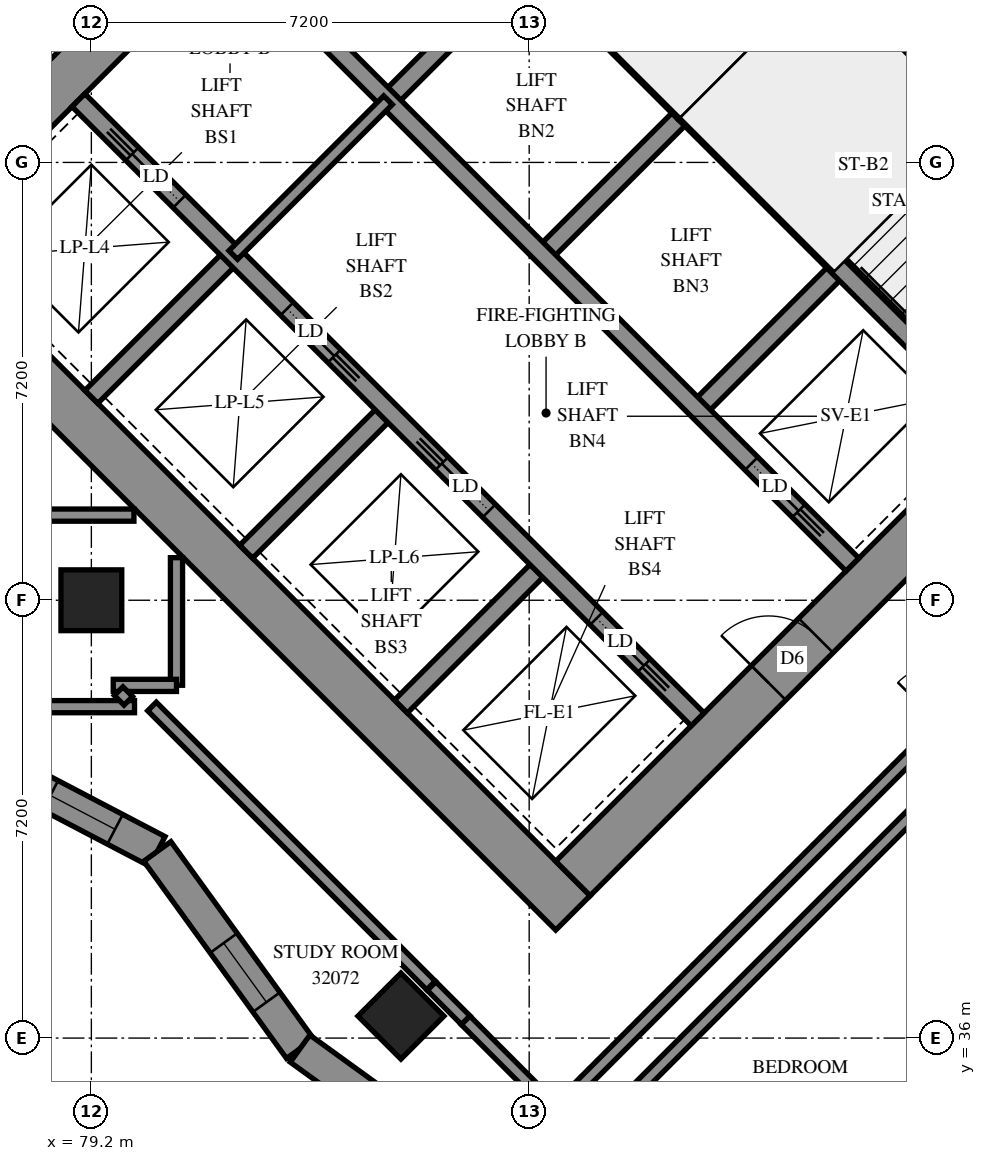
"""IFC4 building model, lengths in metres.
Left out: names, types, materials, properties, quantities, classifications, styles, units other than length and angle.
Written with IfcOpenShell. Run it as: python <this file> out.ifc"""

import sys

from ifc_helpers import new_model, si_unit, direction, frame, frame_2d, origin, origin_2d, place, context, subcontext, project, spatial, polyline, rectangle, outline, extrude, element, fill, save


model = new_model("IFC4")
c1 = context("Model", 3, precision=1e-05, world=origin(), true_north=direction((0.0, 1.0)))
c2 = subcontext(c1, "Body", "Model", "MODEL_VIEW")
j1 = project(units=[si_unit("LENGTHUNIT", "METRE"), si_unit("PLANEANGLEUNIT", "RADIAN")], contexts=[c1])
p1 = place(None, origin())
s1 = spatial("IfcSite", under=j1, at=p1, CompositionType="ELEMENT")
p2 = place(p1, origin())
s2 = spatial("IfcBuilding", under=s1, at=p2, CompositionType="ELEMENT")
p3 = place(p2, frame((0.0, 0.0, 118.6)))
s3 = spatial("IfcBuildingStorey", under=s2, at=p3, CompositionType="ELEMENT", Elevation=118.6)
for number, where, z_axis, x_axis in (
    (1, (79.2, 43.2, 0.0), (0.0, 0.0, 1.0), (1.0, 0.0, 0.0)),
    (2, (84.291, 36.362, 0.0), (0.0, 0.0, 1.0), (0.707, -0.707, 0.0)),
):
    element("IfcColumn", number, at=place(p3, frame(where, z_axis=z_axis, x_axis=x_axis)), inside=s3, PredefinedType="COLUMN", context=c2, shape_type="SweptSolid", body=[
        extrude(rectangle(XDim=1.0, YDim=1.0, at=origin_2d()), origin(), (0.0, 0.0, 1.0), 3.1),
    ])
p4 = place(p3, frame((75.806, 49.373, -0.3), z_axis=(0.0, 0.0, 1.0), x_axis=(0.7071067812, -0.7071067812, 0.0)))
e3 = element("IfcWall", 3, at=p4, inside=s3, PredefinedType="SHEAR", context=c2, shape_type="SweptSolid", body=[
    extrude(rectangle(XDim=16.0, YDim=0.8, at=frame_2d((8.0, 0.0))), origin(), (0.0, 0.0, 1.0), 2.7),
])
p5 = place(p3, frame((86.554, 60.121, -0.3), z_axis=(0.0, 0.0, 1.0), x_axis=(0.7071067812, -0.7071067812, 0.0)))
e4 = element("IfcWall", 4, at=p5, inside=s3, PredefinedType="SHEAR", context=c2, shape_type="SweptSolid", body=[
    extrude(rectangle(XDim=16.0, YDim=0.8, at=frame_2d((8.0, 0.0))), origin(), (0.0, 0.0, 1.0), 2.7),
])
p6 = place(p5, frame((10.8, 0.0, 0.3)))
e5 = element("IfcOpeningElement", 5, at=p6, cuts=e4, PredefinedType="OPENING", context=c2, shape_type="SweptSolid", body=[
    extrude(rectangle(XDim=0.8, YDim=2.1, at=frame_2d((0.4, 1.05))), frame((0.0, 0.41, 0.0), z_axis=(0.0, -1.0, 0.0), x_axis=(1.0, 0.0, 0.0)), (0.0, 0.0, 1.0), 0.82),
])
p7 = place(p3, frame((76.372, 49.373, -0.3), z_axis=(0.0, 0.0, 1.0), x_axis=(0.7071067812, 0.7071067812, 0.0)))
e6 = element("IfcWall", 6, at=p7, inside=s3, PredefinedType="SHEAR", context=c2, shape_type="SweptSolid", body=[
    extrude(rectangle(XDim=14.4, YDim=0.8, at=frame_2d((7.2, 0.0))), origin(), (0.0, 0.0, 1.0), 2.7),
])
p8 = place(p7, frame((4.55, 0.0, 0.3)))
e7 = element("IfcOpeningElement", 7, at=p8, cuts=e6, PredefinedType="OPENING", context=c2, shape_type="SweptSolid", body=[
    extrude(rectangle(XDim=1.1, YDim=2.1, at=frame_2d((0.55, 1.05))), frame((0.0, 0.41, 0.0), z_axis=(0.0, -1.0, 0.0), x_axis=(1.0, 0.0, 0.0)), (0.0, 0.0, 1.0), 0.82),
])
p9 = place(p7, frame((11.35, 0.0, 0.3)))
e8 = element("IfcOpeningElement", 8, at=p9, cuts=e6, PredefinedType="OPENING", context=c2, shape_type="SweptSolid", body=[
    extrude(rectangle(XDim=1.1, YDim=2.1, at=frame_2d((0.55, 1.05))), frame((0.0, 0.41, 0.0), z_axis=(0.0, -1.0, 0.0), x_axis=(1.0, 0.0, 0.0)), (0.0, 0.0, 1.0), 0.82),
])
p10 = place(p3, frame((87.12, 38.625, -0.3), z_axis=(0.0, 0.0, 1.0), x_axis=(0.7071067812, 0.7071067812, 0.0)))
e9 = element("IfcWall", 9, at=p10, inside=s3, PredefinedType="SHEAR", context=c2, shape_type="SweptSolid", body=[
    extrude(rectangle(XDim=14.4, YDim=0.8, at=frame_2d((7.2, 0.0))), origin(), (0.0, 0.0, 1.0), 2.7),
])
p11 = place(p10, frame((4.55, 0.0, 0.3)))
e10 = element("IfcOpeningElement", 10, at=p11, cuts=e9, PredefinedType="OPENING", context=c2, shape_type="SweptSolid", body=[
    extrude(rectangle(XDim=1.1, YDim=2.1, at=frame_2d((0.55, 1.05))), frame((0.0, 0.41, 0.0), z_axis=(0.0, -1.0, 0.0), x_axis=(1.0, 0.0, 0.0)), (0.0, 0.0, 1.0), 0.82),
])
p12 = place(p10, frame((11.35, 0.0, 0.3)))
e11 = element("IfcOpeningElement", 11, at=p12, cuts=e9, PredefinedType="OPENING", context=c2, shape_type="SweptSolid", body=[
    extrude(rectangle(XDim=1.1, YDim=2.1, at=frame_2d((0.55, 1.05))), frame((0.0, 0.41, 0.0), z_axis=(0.0, -1.0, 0.0), x_axis=(1.0, 0.0, 0.0)), (0.0, 0.0, 1.0), 0.82),
])
for number, where, z_axis, x_axis in (
    (12, (79.2, 46.544, 0.0), (0.0, 0.0, 1.0), (0.707, 0.707, 0.0)),
    (13, (84.079, 51.423, 0.0), (0.0, 0.0, 1.0), (0.707, 0.707, 0.0)),
):
    element("IfcWall", number, at=place(p3, frame(where, z_axis=z_axis, x_axis=x_axis)), inside=s3, PredefinedType="SOLIDWALL", context=c2, shape_type="SweptSolid", body=[
        extrude(rectangle(XDim=3.3, YDim=0.3, at=frame_2d((1.65, 0.0))), origin(), (0.0, 0.0, 1.0), 3.1),
    ])
p13 = place(p3, frame((81.746, 43.999, 0.0), z_axis=(0.0, 0.0, 1.0), x_axis=(0.7071067812, 0.7071067812, 0.0)))
e14 = element("IfcWall", 14, at=p13, inside=s3, PredefinedType="SOLIDWALL", context=c2, shape_type="SweptSolid", body=[
    extrude(rectangle(XDim=3.3, YDim=0.3, at=frame_2d((1.65, 0.0))), origin(), (0.0, 0.0, 1.0), 3.1),
])
p14 = place(p3, frame((86.625, 48.878, 0.0), z_axis=(0.0, 0.0, 1.0), x_axis=(0.7071067812, 0.7071067812, 0.0)))
e15 = element("IfcWall", 15, at=p14, inside=s3, PredefinedType="SOLIDWALL", context=c2, shape_type="SweptSolid", body=[
    extrude(rectangle(XDim=3.3, YDim=0.3, at=frame_2d((1.65, 0.0))), origin(), (0.0, 0.0, 1.0), 3.1),
])
p15 = place(p3, frame((84.291, 41.453, 0.0), z_axis=(0.0, 0.0, 1.0), x_axis=(0.7071067812, 0.7071067812, 0.0)))
e16 = element("IfcWall", 16, at=p15, inside=s3, PredefinedType="SOLIDWALL", context=c2, shape_type="SweptSolid", body=[
    extrude(rectangle(XDim=3.3, YDim=0.3, at=frame_2d((1.65, 0.0))), origin(), (0.0, 0.0, 1.0), 3.1),
])
p16 = place(p3, frame((89.17, 46.332, 0.0), z_axis=(0.0, 0.0, 1.0), x_axis=(0.7071067812, 0.7071067812, 0.0)))
e17 = element("IfcWall", 17, at=p16, inside=s3, PredefinedType="SOLIDWALL", context=c2, shape_type="SweptSolid", body=[
    extrude(rectangle(XDim=3.3, YDim=0.3, at=frame_2d((1.65, 0.0))), origin(), (0.0, 0.0, 1.0), 3.1),
])
p17 = place(p3, frame((78.988, 51.423, 0.0), z_axis=(0.0, 0.0, 1.0), x_axis=(0.7071067812, -0.7071067812, 0.0)))
e18 = element("IfcWall", 18, at=p17, inside=s3, PredefinedType="SOLIDWALL", context=c2, shape_type="SweptSolid", body=[
    extrude(rectangle(XDim=14.4, YDim=0.3, at=frame_2d((7.2, 0.0))), origin(), (0.0, 0.0, 1.0), 3.1),
])
p18 = place(p17, frame((1.25, 0.0, 0.0)))
e19 = element("IfcOpeningElement", 19, at=p18, cuts=e18, PredefinedType="OPENING", context=c2, shape_type="SweptSolid", body=[
    extrude(rectangle(XDim=1.1, YDim=2.1, at=frame_2d((0.55, 1.05))), frame((0.0, 0.16, 0.0), z_axis=(0.0, -1.0, 0.0), x_axis=(1.0, 0.0, 0.0)), (0.0, 0.0, 1.0), 0.32),
])
p19 = place(p17, frame((4.85, 0.0, 0.0)))
e20 = element("IfcOpeningElement", 20, at=p19, cuts=e18, PredefinedType="OPENING", context=c2, shape_type="SweptSolid", body=[
    extrude(rectangle(XDim=1.1, YDim=2.1, at=frame_2d((0.55, 1.05))), frame((0.0, 0.16, 0.0), z_axis=(0.0, -1.0, 0.0), x_axis=(1.0, 0.0, 0.0)), (0.0, 0.0, 1.0), 0.32),
])
p20 = place(p17, frame((8.45, 0.0, 0.0)))
e21 = element("IfcOpeningElement", 21, at=p20, cuts=e18, PredefinedType="OPENING", context=c2, shape_type="SweptSolid", body=[
    extrude(rectangle(XDim=1.1, YDim=2.1, at=frame_2d((0.55, 1.05))), frame((0.0, 0.16, 0.0), z_axis=(0.0, -1.0, 0.0), x_axis=(1.0, 0.0, 0.0)), (0.0, 0.0, 1.0), 0.32),
])
p21 = place(p17, frame((12.05, 0.0, 0.0)))
e22 = element("IfcOpeningElement", 22, at=p21, cuts=e18, PredefinedType="OPENING", context=c2, shape_type="SweptSolid", body=[
    extrude(rectangle(XDim=1.1, YDim=2.1, at=frame_2d((0.55, 1.05))), frame((0.0, 0.16, 0.0), z_axis=(0.0, -1.0, 0.0), x_axis=(1.0, 0.0, 0.0)), (0.0, 0.0, 1.0), 0.32),
])
p22 = place(p3, frame((81.534, 53.969, 0.0), z_axis=(0.0, 0.0, 1.0), x_axis=(0.707103309, -0.7071102534, 0.0)))
e23 = element("IfcWall", 23, at=p22, inside=s3, PredefinedType="SOLIDWALL", context=c2, shape_type="SweptSolid", body=[
    extrude(rectangle(XDim=14.4, YDim=0.3, at=frame_2d((7.2, 0.0))), origin(), (0.0, 0.0, 1.0), 3.1),
])
p23 = place(p22, frame((12.05, 0.0, 0.0)))
e24 = element("IfcOpeningElement", 24, at=p23, cuts=e23, PredefinedType="OPENING", context=c2, shape_type="SweptSolid", body=[
    extrude(rectangle(XDim=1.1, YDim=2.1, at=frame_2d((0.55, 1.05))), frame((0.0, 0.16, 0.0), z_axis=(0.0, -1.0, 0.0), x_axis=(1.0, 0.0, 0.0)), (0.0, 0.0, 1.0), 0.32),
])
for number, where, z_axis, x_axis in (
    (25, (83.867, 56.302, 0.0), (0.0, 0.0, 1.0), (0.707, -0.707, 0.0)),
    (26, (88.958, 51.211, 0.0), (0.0, 0.0, 1.0), (0.707, -0.707, 0.0)),
):
    element("IfcWall", number, at=place(p3, frame(where, z_axis=z_axis, x_axis=x_axis)), inside=s3, PredefinedType="SOLIDWALL", context=c2, shape_type="SweptSolid", body=[
        extrude(rectangle(XDim=7.2, YDim=0.3, at=frame_2d((3.6, 0.0))), origin(), (0.0, 0.0, 1.0), 3.1),
    ])
p24 = place(p3, frame((88.958, 51.211, 0.0), z_axis=(0.0, 0.0, 1.0), x_axis=(0.7071067812, 0.7071067812, 0.0)))
e27 = element("IfcWall", 27, at=p24, inside=s3, PredefinedType="SOLIDWALL", context=c2, shape_type="SweptSolid", body=[
    extrude(rectangle(XDim=4.2, YDim=0.3, at=frame_2d((2.1, 0.0))), origin(), (0.0, 0.0, 1.0), 3.1),
])
p25 = place(p3, frame((76.561, 41.019, 0.0), z_axis=(0.0, 0.0, 1.0), x_axis=(0.8859460506, -0.4637883089, 0.0)))
e28 = element("IfcWall", 28, at=p25, inside=s3, PredefinedType="SOLIDWALL", context=c2, shape_type="SweptSolid", body=[
    extrude(outline(polyline([(0.019, -0.275), (4.139, -0.275), (4.268, 0.275), (-0.019, 0.275), (0.019, -0.275)])), origin(), (0.0, 0.0, 1.0), 3.1),
])
p26 = place(p25, frame((0.717, 0.0, 0.5)))
e29 = element("IfcOpeningElement", 29, at=p26, cuts=e28, PredefinedType="OPENING", context=c2, shape_type="SweptSolid", body=[
    extrude(rectangle(XDim=1.2, YDim=2.45, at=frame_2d((0.6, 1.225))), frame((0.0, 0.285, 0.0), z_axis=(0.0, -1.0, 0.0), x_axis=(1.0, 0.0, 0.0)), (0.0, 0.0, 1.0), 0.57),
])
p27 = place(p25, frame((2.219, 0.0, 0.5)))
e30 = element("IfcOpeningElement", 30, at=p27, cuts=e28, PredefinedType="OPENING", context=c2, shape_type="SweptSolid", body=[
    extrude(rectangle(XDim=1.2, YDim=2.45, at=frame_2d((0.6, 1.225))), frame((0.0, 0.285, 0.0), z_axis=(0.0, -1.0, 0.0), x_axis=(1.0, 0.0, 0.0)), (0.0, 0.0, 1.0), 0.57),
])
p28 = place(p3, frame((80.285, 39.07, 0.0), z_axis=(0.0, 0.0, 1.0), x_axis=(0.5863448025, -0.8100615857, 0.0)))
e31 = element("IfcWall", 31, at=p28, inside=s3, PredefinedType="SOLIDWALL", context=c2, shape_type="SweptSolid", body=[
    extrude(outline(polyline([(0.065, -0.275), (4.047, -0.275), (3.959, 0.275), (-0.065, 0.275), (0.065, -0.275)])), origin(), (0.0, 0.0, 1.0), 3.1),
])
p29 = place(p28, frame((1.861, 0.0, 0.5)))
e32 = element("IfcOpeningElement", 32, at=p29, cuts=e31, PredefinedType="OPENING", context=c2, shape_type="SweptSolid", body=[
    extrude(rectangle(XDim=1.2, YDim=2.45, at=frame_2d((0.6, 1.225))), frame((0.0, 0.285, 0.0), z_axis=(0.0, -1.0, 0.0), x_axis=(1.0, 0.0, 0.0)), (0.0, 0.0, 1.0), 0.57),
])
p30 = place(p3, frame((82.632, 35.827, 0.0), z_axis=(0.0, 0.0, 1.0), x_axis=(0.8100630266, -0.5863428119, 0.0)))
e33 = element("IfcWall", 33, at=p30, inside=s3, PredefinedType="SOLIDWALL", context=c2, shape_type="SweptSolid", body=[
    extrude(outline(polyline([(-0.044, -0.275), (3.939, -0.275), (4.027, 0.275), (0.044, 0.275), (-0.044, -0.275)])), origin(), (0.0, 0.0, 1.0), 3.1),
])
p31 = place(p30, frame((1.694, 0.0, 0.5)))
e34 = element("IfcOpeningElement", 34, at=p31, cuts=e33, PredefinedType="OPENING", context=c2, shape_type="SweptSolid", body=[
    extrude(rectangle(XDim=1.2, YDim=2.45, at=frame_2d((0.6, 1.225))), frame((0.0, 0.285, 0.0), z_axis=(0.0, -1.0, 0.0), x_axis=(1.0, 0.0, 0.0)), (0.0, 0.0, 1.0), 0.57),
])
p32 = place(p3, frame((91.313, 53.354, 0.0), z_axis=(0.0, 0.0, 1.0), x_axis=(0.7071067812, -0.7071067812, 0.0)))
e35 = element("IfcWall", 35, at=p32, inside=s3, PredefinedType="PARTITIONING", context=c2, shape_type="SweptSolid", body=[
    extrude(rectangle(XDim=5.65, YDim=0.15, at=frame_2d((2.825, 0.0))), origin(), (0.0, 0.0, 1.0), 3.1),
])
p33 = place(p3, frame((81.534, 48.878, 0.0), z_axis=(0.0, 0.0, 1.0), x_axis=(0.707092892, 0.7071206701, 0.0)))
e36 = element("IfcWall", 36, at=p33, inside=s3, PredefinedType="PARTITIONING", context=c2, shape_type="SweptSolid", body=[
    extrude(rectangle(XDim=3.6, YDim=0.2, at=frame_2d((1.8, 0.0))), origin(), (0.0, 0.0, 1.0), 3.1),
])
p34 = place(p3, frame((86.329, 33.31, 0.0), z_axis=(0.0, 0.0, 1.0), x_axis=(0.7071067812, 0.7071067812, 0.0)))
e37 = element("IfcWall", 37, at=p34, inside=s3, PredefinedType="PARTITIONING", context=c2, shape_type="SweptSolid", body=[
    extrude(rectangle(XDim=11.617, YDim=0.2, at=frame_2d((5.808, 0.0))), origin(), (0.0, 0.0, 1.0), 3.1),
])
p35 = place(p3, frame((91.45, 28.248, 0.0), z_axis=(0.0, 0.0, 1.0), x_axis=(0.7071931644, 0.7070203875, 0.0)))
e38 = element("IfcWall", 38, at=p35, inside=s3, PredefinedType="PARTITIONING", context=c2, shape_type="SweptSolid", body=[
    extrude(rectangle(XDim=11.576, YDim=0.2, at=frame_2d((5.788, 0.0))), origin(), (0.0, 0.0, 1.0), 3.1),
])
p36 = place(p3, frame((86.835, 34.806, 0.0), z_axis=(0.0, 0.0, 1.0), x_axis=(0.7071067812, 0.7071067812, 0.0)))
e39 = element("IfcWall", 39, at=p36, inside=s3, PredefinedType="PARTITIONING", context=c2, shape_type="SweptSolid", body=[
    extrude(rectangle(XDim=10.201, YDim=0.2, at=frame_2d((5.1, 0.0))), origin(), (0.0, 0.0, 1.0), 3.1),
])
p37 = place(p36, frame((8.959, 0.0, 0.0)))
e40 = element("IfcOpeningElement", 40, at=p37, cuts=e39, PredefinedType="OPENING", context=c2, shape_type="SweptSolid", body=[
    extrude(rectangle(XDim=1.0, YDim=2.1, at=frame_2d((0.5, 1.05))), frame((0.0, 0.11, 0.0), z_axis=(0.0, -1.0, 0.0), x_axis=(1.0, 0.0, 0.0)), (0.0, 0.0, 1.0), 0.22),
])
p38 = place(p3, frame((80.197, 41.453, 0.0), z_axis=(0.0, 0.0, 1.0), x_axis=(0.7071067812, -0.7071067812, 0.0)))
e41 = element("IfcWall", 41, at=p38, inside=s3, PredefinedType="PARTITIONING", context=c2, shape_type="SweptSolid", body=[
    extrude(rectangle(XDim=6.488, YDim=0.2, at=frame_2d((3.244, 0.0))), origin(), (0.0, 0.0, 1.0), 3.1),
])
p39 = place(p3, frame((89.881, 31.771, 0.0), z_axis=(0.0, 0.0, 1.0), x_axis=(0.7071067812, 0.7071067812, 0.0)))
e42 = element("IfcWall", 42, at=p39, inside=s3, PredefinedType="PARTITIONING", context=c2, shape_type="SweptSolid", body=[
    extrude(rectangle(XDim=5.787, YDim=0.2, at=frame_2d((2.893, 0.0))), origin(), (0.0, 0.0, 1.0), 3.1),
])
p40 = place(p3, frame((77.452, 41.45, 0.0), z_axis=(0.0, 0.0, 1.0), x_axis=(1.0, 0.0, 0.0)))
e43 = element("IfcWall", 43, at=p40, inside=s3, PredefinedType="PARTITIONING", context=c2, shape_type="SweptSolid", body=[
    extrude(rectangle(XDim=2.458, YDim=0.2, at=frame_2d((1.229, 0.0))), origin(), (0.0, 0.0, 1.0), 3.1),
])
p41 = place(p3, frame((85.353, 36.293, 0.0), z_axis=(0.0, 0.0, 1.0), x_axis=(0.7066304548, -0.7075827869, 0.0)))
e44 = element("IfcWall", 44, at=p41, inside=s3, PredefinedType="PARTITIONING", context=c2, shape_type="SweptSolid", body=[
    extrude(rectangle(XDim=2.1, YDim=0.2, at=frame_2d((1.05, 0.0))), origin(), (0.0, 0.0, 1.0), 3.1),
])
for number, where, z_axis, x_axis in (
    (45, (77.802, 44.6, 0.0), (0.0, 0.0, 1.0), (1.0, 0.0, 0.0)),
    (46, (80.6, 41.802, 0.0), (0.0, 0.0, 1.0), (0.0, 1.0, 0.0)),
):
    element("IfcWall", number, at=place(p3, frame(where, z_axis=z_axis, x_axis=x_axis)), inside=s3, PredefinedType="PARTITIONING", context=c2, shape_type="SweptSolid", body=[
        extrude(rectangle(XDim=2.098, YDim=0.2, at=frame_2d((1.049, 0.0))), origin(), (0.0, 0.0, 1.0), 3.1),
    ])
p42 = place(p3, frame((79.56, 41.8, 0.0), z_axis=(0.0, 0.0, 1.0), x_axis=(1.0, 0.0, 0.0)))
e47 = element("IfcWall", 47, at=p42, inside=s3, PredefinedType="PARTITIONING", context=c2, shape_type="SweptSolid", body=[
    extrude(rectangle(XDim=1.04, YDim=0.2, at=frame_2d((0.52, 0.0))), origin(), (0.0, 0.0, 1.0), 3.1),
])
p43 = place(p3, frame((84.795, 36.855, 0.0), z_axis=(0.0, 0.0, 1.0), x_axis=(0.7071067812, -0.7071067812, 0.0)))
e48 = element("IfcWall", 48, at=p43, inside=s3, PredefinedType="PARTITIONING", context=c2, shape_type="SweptSolid", body=[
    extrude(rectangle(XDim=0.792, YDim=0.2, at=frame_2d((0.396, 0.0))), origin(), (0.0, 0.0, 1.0), 3.1),
])
p44 = place(p3, frame((79.649, 41.705, 0.0), z_axis=(0.0, 0.0, 1.0), x_axis=(0.7068844555, -0.707329037, 0.0)))
e49 = element("IfcWall", 49, at=p44, inside=s3, PredefinedType="PARTITIONING", context=c2, shape_type="SweptSolid", body=[
    extrude(rectangle(XDim=0.225, YDim=0.2, at=frame_2d((0.112, 0.0))), origin(), (0.0, 0.0, 1.0), 3.1),
])
p45 = place(p27, origin())
e50 = element("IfcWindow", 50, at=p45, inside=s3, PartitioningType="SINGLE_PANEL", PredefinedType="WINDOW", context=c2, shape_type="SweptSolid", body=[
    extrude(rectangle(XDim=1.2, YDim=2.45, at=frame_2d((0.6, 1.225))), frame((0.0, 0.155, 0.0), z_axis=(0.0, -1.0, 0.0), x_axis=(1.0, 0.0, 0.0)), (0.0, 0.0, 1.0), 0.06),
])
fill(e30, e50)
p46 = place(p29, origin())
e51 = element("IfcWindow", 51, at=p46, inside=s3, PartitioningType="SINGLE_PANEL", PredefinedType="WINDOW", context=c2, shape_type="SweptSolid", body=[
    extrude(rectangle(XDim=1.2, YDim=2.45, at=frame_2d((0.6, 1.225))), frame((0.0, 0.155, 0.0), z_axis=(0.0, -1.0, 0.0), x_axis=(1.0, 0.0, 0.0)), (0.0, 0.0, 1.0), 0.06),
])
fill(e32, e51)
p47 = place(p11, origin())
e52 = element("IfcDoor", 52, at=p47, inside=s3, OperationType="DOUBLE_DOOR_SINGLE_SWING", PredefinedType="DOOR", context=c2, shape_type="SweptSolid", body=[
    extrude(rectangle(XDim=1.1, YDim=2.1, at=frame_2d((0.55, 1.05))), frame((0.0, 0.025, 0.0), z_axis=(0.0, -1.0, 0.0), x_axis=(1.0, 0.0, 0.0)), (0.0, 0.0, 1.0), 0.05),
])
fill(e10, e52)
p48 = place(p18, origin())
e53 = element("IfcDoor", 53, at=p48, inside=s3, OperationType="SLIDING_TO_LEFT", PredefinedType="DOOR", context=c2, shape_type="SweptSolid", body=[
    extrude(rectangle(XDim=1.1, YDim=2.1, at=frame_2d((0.55, 1.05))), frame((0.0, 0.025, 0.0), z_axis=(0.0, -1.0, 0.0), x_axis=(1.0, 0.0, 0.0)), (0.0, 0.0, 1.0), 0.05),
])
fill(e19, e53)
p49 = place(p19, origin())
e54 = element("IfcDoor", 54, at=p49, inside=s3, OperationType="SLIDING_TO_RIGHT", PredefinedType="DOOR", context=c2, shape_type="SweptSolid", body=[
    extrude(rectangle(XDim=1.1, YDim=2.1, at=frame_2d((0.55, 1.05))), frame((0.0, 0.025, 0.0), z_axis=(0.0, -1.0, 0.0), x_axis=(1.0, 0.0, 0.0)), (0.0, 0.0, 1.0), 0.05),
])
fill(e20, e54)
p50 = place(p20, origin())
e55 = element("IfcDoor", 55, at=p50, inside=s3, OperationType="SLIDING_TO_LEFT", PredefinedType="DOOR", context=c2, shape_type="SweptSolid", body=[
    extrude(rectangle(XDim=1.1, YDim=2.1, at=frame_2d((0.55, 1.05))), frame((0.0, 0.025, 0.0), z_axis=(0.0, -1.0, 0.0), x_axis=(1.0, 0.0, 0.0)), (0.0, 0.0, 1.0), 0.05),
])
fill(e21, e55)
p51 = place(p21, origin())
e56 = element("IfcDoor", 56, at=p51, inside=s3, OperationType="SLIDING_TO_RIGHT", PredefinedType="DOOR", context=c2, shape_type="SweptSolid", body=[
    extrude(rectangle(XDim=1.1, YDim=2.1, at=frame_2d((0.55, 1.05))), frame((0.0, 0.025, 0.0), z_axis=(0.0, -1.0, 0.0), x_axis=(1.0, 0.0, 0.0)), (0.0, 0.0, 1.0), 0.05),
])
fill(e22, e56)
p52 = place(p23, origin())
e57 = element("IfcDoor", 57, at=p52, inside=s3, OperationType="SLIDING_TO_RIGHT", PredefinedType="DOOR", context=c2, shape_type="SweptSolid", body=[
    extrude(rectangle(XDim=1.1, YDim=2.1, at=frame_2d((0.55, 1.05))), frame((0.0, 0.025, 0.0), z_axis=(0.0, -1.0, 0.0), x_axis=(1.0, 0.0, 0.0)), (0.0, 0.0, 1.0), 0.05),
])
fill(e24, e57)
save(model, sys.argv[1])
